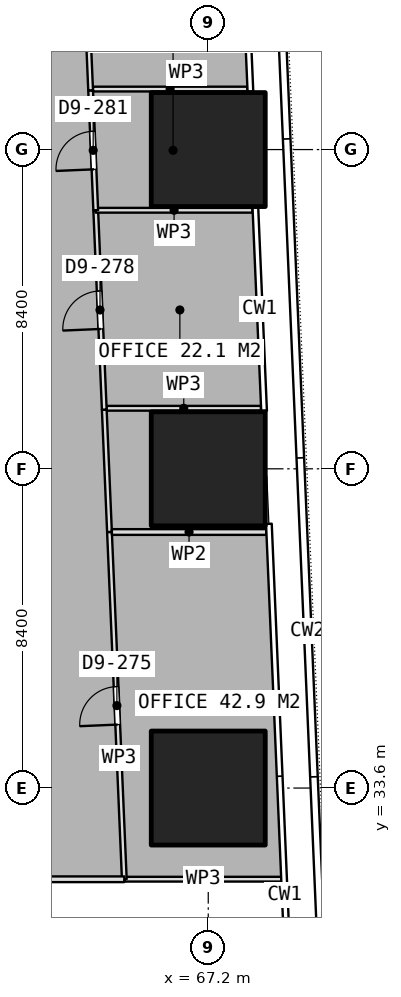
"""IFC4 building model, lengths in metres.
Left out: names, types, materials, properties, quantities, classifications, styles, units other than length and angle.
Written with IfcOpenShell. Run it as: python <this file> out.ifc"""

import sys

from ifc_helpers import new_model, si_unit, direction, frame, frame_2d, origin, origin_2d, place, context, subcontext, project, spatial, rectangle, extrude, element, fill, save


model = new_model("IFC4")
c1 = context("Model", 3, precision=1e-05, world=origin(), true_north=direction((0.0, 1.0)))
c2 = subcontext(c1, "Body", "Model", "MODEL_VIEW")
j1 = project(units=[si_unit("LENGTHUNIT", "METRE"), si_unit("PLANEANGLEUNIT", "RADIAN")], contexts=[c1])
p1 = place(None, origin())
s1 = spatial("IfcSite", under=j1, at=p1, CompositionType="ELEMENT")
p2 = place(p1, origin())
s2 = spatial("IfcBuilding", under=s1, at=p2, CompositionType="ELEMENT")
p3 = place(p2, frame((0.0, 0.0, 77.9)))
s3 = spatial("IfcBuildingStorey", under=s2, at=p3, CompositionType="ELEMENT", Elevation=77.9)
for number, where, z_axis, x_axis in (
    (1, (67.2, 33.6, 0.0), (0.0, 0.0, 1.0), (1.0, 0.0, 0.0)),
    (2, (67.2, 42.0, 0.0), (0.0, 0.0, 1.0), (1.0, 0.0, 0.0)),
    (3, (67.2, 50.4, 0.0), (0.0, 0.0, 1.0), (1.0, 0.0, 0.0)),
):
    element("IfcColumn", number, at=place(p3, frame(where, z_axis=z_axis, x_axis=x_axis)), inside=s3, PredefinedType="COLUMN", context=c2, shape_type="SweptSolid", body=[
        extrude(rectangle(XDim=3.0, YDim=3.0, at=origin_2d()), origin(), (0.0, 0.0, 1.0), 3.75),
    ])
p4 = place(p3, frame((64.525, 43.593, 0.0), z_axis=(0.0, 0.0, 1.0), x_axis=(1.0, 0.0, 0.0)))
e4 = element("IfcWall", 4, at=p4, inside=s3, PredefinedType="PARTITIONING", context=c2, shape_type="SweptSolid", body=[
    extrude(rectangle(XDim=4.061, YDim=0.125, at=frame_2d((2.031, 0.0))), origin(), (0.0, 0.0, 1.0), 3.5),
])
p5 = place(p3, frame((69.145, 31.202, 0.0), z_axis=(0.0, 0.0, 1.0), x_axis=(-1.0, 0.0, 0.0)))
e5 = element("IfcWall", 5, at=p5, inside=s3, PredefinedType="PARTITIONING", context=c2, shape_type="SweptSolid", body=[
    extrude(rectangle(XDim=4.154, YDim=0.125, at=frame_2d((2.077, 0.0))), origin(), (0.0, 0.0, 1.0), 3.5),
])
p6 = place(p3, frame((64.991, 31.202, 0.0), z_axis=(0.0, 0.0, 1.0), x_axis=(-0.042637761781, 0.999090597128, 0.0)))
e6 = element("IfcWall", 6, at=p6, inside=s3, PredefinedType="PARTITIONING", context=c2, shape_type="SweptSolid", body=[
    extrude(rectangle(XDim=9.144, YDim=0.125, at=frame_2d((4.572, 0.0))), origin(), (0.0, 0.0, 1.0), 3.5),
])
p7 = place(p6, frame((4.072, 0.0, 0.0)))
e7 = element("IfcOpeningElement", 7, at=p7, cuts=e6, PredefinedType="OPENING", context=c2, shape_type="SweptSolid", body=[
    extrude(rectangle(XDim=1.0, YDim=2.1, at=frame_2d((0.5, 1.05))), frame((0.0, 0.073, 0.0), z_axis=(0.0, -1.0, 0.0), x_axis=(1.0, 0.0, 0.0)), (0.0, 0.0, 1.0), 0.145),
])
p8 = place(p3, frame((64.601, 40.338, 0.0), z_axis=(0.0, 0.0, 1.0), x_axis=(-0.042522765682, 0.999095498138, 0.0)))
e8 = element("IfcWall", 8, at=p8, inside=s3, PredefinedType="PARTITIONING", context=c2, shape_type="SweptSolid", body=[
    extrude(rectangle(XDim=3.221, YDim=0.125, at=frame_2d((1.61, 0.0))), origin(), (0.0, 0.0, 1.0), 3.5),
])
p9 = place(p3, frame((64.464, 43.557, 0.0), z_axis=(0.0, 0.0, 1.0), x_axis=(-0.042868225882, 0.999080735081, 0.0)))
e9 = element("IfcWall", 9, at=p9, inside=s3, PredefinedType="PARTITIONING", context=c2, shape_type="SweptSolid", body=[
    extrude(rectangle(XDim=5.251, YDim=0.125, at=frame_2d((2.625, 0.0))), origin(), (0.0, 0.0, 1.0), 3.5),
])
p10 = place(p9, frame((2.125, 0.0, 0.0)))
e10 = element("IfcOpeningElement", 10, at=p10, cuts=e9, PredefinedType="OPENING", context=c2, shape_type="SweptSolid", body=[
    extrude(rectangle(XDim=1.0, YDim=2.1, at=frame_2d((0.5, 1.05))), frame((0.0, 0.073, 0.0), z_axis=(0.0, -1.0, 0.0), x_axis=(1.0, 0.0, 0.0)), (0.0, 0.0, 1.0), 0.145),
])
p11 = place(p3, frame((64.239, 48.803, 0.0), z_axis=(0.0, 0.0, 1.0), x_axis=(1.0, 0.0, 0.0)))
e11 = element("IfcWall", 11, at=p11, inside=s3, PredefinedType="PARTITIONING", context=c2, shape_type="SweptSolid", body=[
    extrude(rectangle(XDim=4.124, YDim=0.125, at=frame_2d((2.062, 0.0))), origin(), (0.0, 0.0, 1.0), 3.5),
])
p12 = place(p3, frame((64.239, 48.804, 0.0), z_axis=(0.0, 0.0, 1.0), x_axis=(-0.042483490494, 0.999097168966, 0.0)))
e12 = element("IfcWall", 12, at=p12, inside=s3, PredefinedType="PARTITIONING", context=c2, shape_type="SweptSolid", body=[
    extrude(rectangle(XDim=3.155, YDim=0.125, at=frame_2d((1.578, 0.0))), origin(), (0.0, 0.0, 1.0), 3.5),
])
p13 = place(p12, frame((1.077, 0.0, 0.0)))
e13 = element("IfcOpeningElement", 13, at=p13, cuts=e12, PredefinedType="OPENING", context=c2, shape_type="SweptSolid", body=[
    extrude(rectangle(XDim=1.0, YDim=2.1, at=frame_2d((0.5, 1.05))), frame((0.0, 0.073, 0.0), z_axis=(0.0, -1.0, 0.0), x_axis=(1.0, 0.0, 0.0)), (0.0, 0.0, 1.0), 0.145),
])
p14 = place(p3, frame((64.166, 51.992, 0.0), z_axis=(0.0, 0.0, 1.0), x_axis=(1.0, 0.0, 0.0)))
e14 = element("IfcWall", 14, at=p14, inside=s3, PredefinedType="PARTITIONING", context=c2, shape_type="SweptSolid", body=[
    extrude(rectangle(XDim=4.061, YDim=0.125, at=frame_2d((2.031, 0.0))), origin(), (0.0, 0.0, 1.0), 3.5),
])
p15 = place(p3, frame((64.105, 51.957, 0.0), z_axis=(0.0, 0.0, 1.0), x_axis=(-0.042654443866, 0.999089885055, 0.0)))
e15 = element("IfcWall", 15, at=p15, inside=s3, PredefinedType="PARTITIONING", context=c2, shape_type="SweptSolid", body=[
    extrude(rectangle(XDim=4.453, YDim=0.125, at=frame_2d((2.227, 0.0))), origin(), (0.0, 0.0, 1.0), 3.5),
])
p16 = place(p3, frame((64.664, 40.337, 0.0), z_axis=(0.0, 0.0, 1.0), x_axis=(1.0, 0.0, 0.0)))
e16 = element("IfcWall", 16, at=p16, inside=s3, PredefinedType="PARTITIONING", context=c2, shape_type="SweptSolid", body=[
    extrude(rectangle(XDim=4.061, YDim=0.15, at=frame_2d((2.031, 0.0))), origin(), (0.0, 0.0, 1.0), 3.5),
])
p17 = place(p3, frame((64.991, 31.2, 0.0), z_axis=(0.0, 0.0, 1.0), x_axis=(-1.0, 0.0, 0.0)))
e17 = element("IfcWall", 17, at=p17, inside=s3, PredefinedType="PARTITIONING", context=c2, shape_type="SweptSolid", body=[
    extrude(rectangle(XDim=11.591, YDim=0.15, at=frame_2d((5.795, 0.0))), origin(), (0.0, 0.0, 1.0), 3.5),
])
p18 = place(p7, origin())
e18 = element("IfcDoor", 18, at=p18, inside=s3, OperationType="SINGLE_SWING_LEFT", PredefinedType="DOOR", context=c2, shape_type="SweptSolid", body=[
    extrude(rectangle(XDim=1.0, YDim=2.1, at=frame_2d((0.5, 1.05))), frame((0.0, 0.025, 0.0), z_axis=(0.0, -1.0, 0.0), x_axis=(1.0, 0.0, 0.0)), (0.0, 0.0, 1.0), 0.05),
])
fill(e7, e18)
p19 = place(p10, origin())
e19 = element("IfcDoor", 19, at=p19, inside=s3, OperationType="SINGLE_SWING_LEFT", PredefinedType="DOOR", context=c2, shape_type="SweptSolid", body=[
    extrude(rectangle(XDim=1.0, YDim=2.1, at=frame_2d((0.5, 1.05))), frame((0.0, 0.025, 0.0), z_axis=(0.0, -1.0, 0.0), x_axis=(1.0, 0.0, 0.0)), (0.0, 0.0, 1.0), 0.05),
])
fill(e10, e19)
p20 = place(p13, origin())
e20 = element("IfcDoor", 20, at=p20, inside=s3, OperationType="SINGLE_SWING_LEFT", PredefinedType="DOOR", context=c2, shape_type="SweptSolid", body=[
    extrude(rectangle(XDim=1.0, YDim=2.1, at=frame_2d((0.5, 1.05))), frame((0.0, 0.025, 0.0), z_axis=(0.0, -1.0, 0.0), x_axis=(1.0, 0.0, 0.0)), (0.0, 0.0, 1.0), 0.05),
])
fill(e13, e20)
save(model, sys.argv[1])
